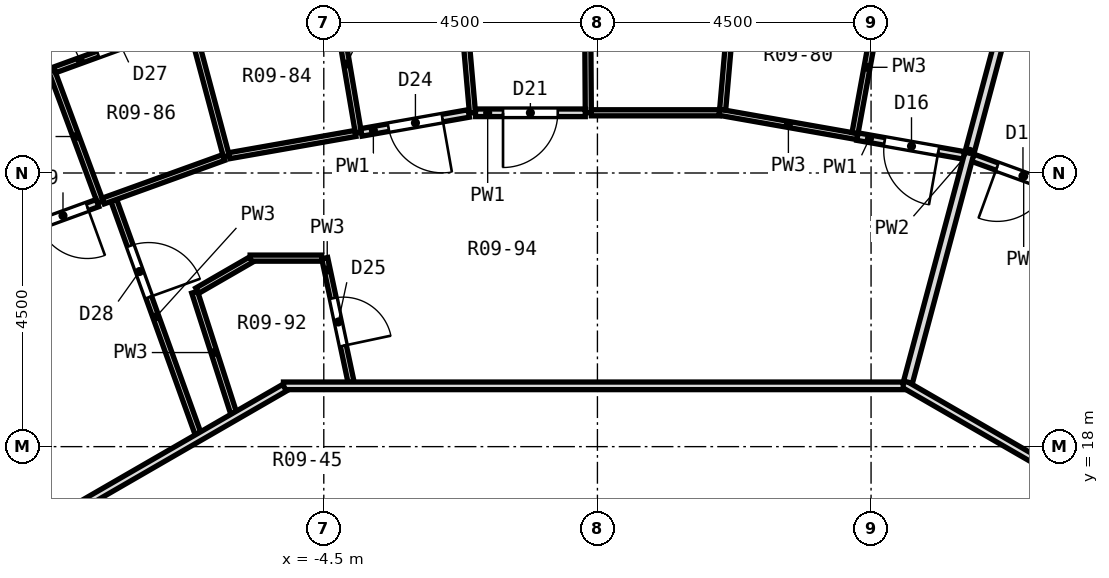
"""IFC4 building model, lengths in metres.
Left out: names, types, materials, properties, quantities, classifications, styles, units other than length and angle.
Written with IfcOpenShell. Run it as: python <this file> out.ifc"""

import sys

from ifc_helpers import new_model, si_unit, direction, frame, frame_2d, origin, place, context, subcontext, project, spatial, rectangle, extrude, element, fill, save


model = new_model("IFC4")
c1 = context("Model", 3, precision=1e-05, world=origin(), true_north=direction((0.0, 1.0)))
c2 = subcontext(c1, "Body", "Model", "MODEL_VIEW")
j1 = project(units=[si_unit("LENGTHUNIT", "METRE"), si_unit("PLANEANGLEUNIT", "RADIAN")], contexts=[c1])
p1 = place(None, origin())
s1 = spatial("IfcSite", under=j1, at=p1, CompositionType="ELEMENT")
p2 = place(p1, origin())
s2 = spatial("IfcBuilding", under=s1, at=p2, CompositionType="ELEMENT")
p3 = place(p2, frame((0.0, 0.0, 26.3)))
s3 = spatial("IfcBuildingStorey", under=s2, at=p3, CompositionType="ELEMENT", Elevation=26.3)
p4 = place(p3, frame((-0.165, 25.79, 0.0), z_axis=(0.0, 0.0, 1.0), x_axis=(0.006580899844, -0.999978345644, 0.0)))
e1 = element("IfcWall", 1, at=p4, inside=s3, PredefinedType="PARTITIONING", context=c2, shape_type="SweptSolid", body=[
    extrude(rectangle(XDim=2.3, YDim=0.1, at=frame_2d((1.15, 0.0))), origin(), (0.0, 0.0, 1.0), 2.75),
])
p5 = place(p3, frame((-2.405, 27.485, 0.0), z_axis=(0.0, 0.0, 1.0), x_axis=(0.087176012461, -0.996192924514, 0.0)))
e2 = element("IfcWall", 2, at=p5, inside=s3, PredefinedType="PARTITIONING", context=c2, shape_type="SweptSolid", body=[
    extrude(rectangle(XDim=4.01, YDim=0.1, at=frame_2d((2.005, 0.0))), origin(), (0.0, 0.0, 1.0), 2.75),
])
p6 = place(p3, frame((-4.316, 25.426, 0.0), z_axis=(0.0, 0.0, 1.0), x_axis=(0.167445855502, -0.985881273519, 0.0)))
e3 = element("IfcWall", 3, at=p6, inside=s3, PredefinedType="PARTITIONING", context=c2, shape_type="SweptSolid", body=[
    extrude(rectangle(XDim=2.299, YDim=0.1, at=frame_2d((1.15, 0.0))), origin(), (0.0, 0.0, 1.0), 2.75),
])
p7 = place(p3, frame((-4.485, 21.1, 0.0), z_axis=(0.0, 0.0, 1.0), x_axis=(0.207769107872, -0.978177896813, 0.0)))
e4 = element("IfcWall", 4, at=p7, inside=s3, PredefinedType="PARTITIONING", context=c2, shape_type="SweptSolid", body=[
    extrude(rectangle(XDim=2.084, YDim=0.1, at=frame_2d((1.042, 0.0))), origin(), (0.0, 0.0, 1.0), 2.75),
])
p8 = place(p7, frame((0.673, 0.0, 0.0)))
e5 = element("IfcOpeningElement", 5, at=p8, cuts=e4, PredefinedType="OPENING", context=c2, shape_type="SweptSolid", body=[
    extrude(rectangle(XDim=0.8, YDim=2.1, at=frame_2d((0.4, 1.05))), frame((0.0, 0.062, 0.0), z_axis=(0.0, -1.0, 0.0), x_axis=(1.0, 0.0, 0.0)), (0.0, 0.0, 1.0), 0.124),
])
p9 = place(p3, frame((-7.138, 26.651, 0.0), z_axis=(0.0, 0.0, 1.0), x_axis=(0.258102122941, -0.966117639904, 0.0)))
e6 = element("IfcWall", 6, at=p9, inside=s3, PredefinedType="PARTITIONING", context=c2, shape_type="SweptSolid", body=[
    extrude(rectangle(XDim=4.011, YDim=0.1, at=frame_2d((2.005, 0.0))), origin(), (0.0, 0.0, 1.0), 2.75),
])
p10 = place(p3, frame((-6.624, 20.54, 0.0), z_axis=(0.0, 0.0, 1.0), x_axis=(0.306694945769, -0.951807864141, 0.0)))
e7 = element("IfcWall", 7, at=p10, inside=s3, PredefinedType="PARTITIONING", context=c2, shape_type="SweptSolid", body=[
    extrude(rectangle(XDim=2.086, YDim=0.1, at=frame_2d((1.043, 0.0))), origin(), (0.0, 0.0, 1.0), 2.75),
])
p11 = place(p3, frame((-7.953, 22.049, 0.0), z_axis=(0.0, 0.0, 1.0), x_axis=(0.339432395801, -0.940630452771, 0.0)))
e8 = element("IfcWall", 8, at=p11, inside=s3, PredefinedType="PARTITIONING", context=c2, shape_type="SweptSolid", body=[
    extrude(rectangle(XDim=4.074, YDim=0.1, at=frame_2d((2.037, 0.0))), origin(), (0.0, 0.0, 1.0), 2.75),
])
p12 = place(p11, frame((0.793, 0.0, 0.0)))
e9 = element("IfcOpeningElement", 9, at=p12, cuts=e8, PredefinedType="OPENING", context=c2, shape_type="SweptSolid", body=[
    extrude(rectangle(XDim=0.9, YDim=2.1, at=frame_2d((0.45, 1.05))), frame((0.0, 0.062, 0.0), z_axis=(0.0, -1.0, 0.0), x_axis=(1.0, 0.0, 0.0)), (0.0, 0.0, 1.0), 0.124),
])
p13 = place(p3, frame((-8.975, 24.178, 0.0), z_axis=(0.0, 0.0, 1.0), x_axis=(0.347898637283, -0.937532153143, 0.0)))
e10 = element("IfcWall", 10, at=p13, inside=s3, PredefinedType="PARTITIONING", context=c2, shape_type="SweptSolid", body=[
    extrude(rectangle(XDim=2.3, YDim=0.1, at=frame_2d((1.15, 0.0))), origin(), (0.0, 0.0, 1.0), 2.75),
])
p14 = place(p3, frame((5.029, 19.036, 0.0), z_axis=(0.0, 0.0, 1.0), x_axis=(0.866024825845, -0.50000100102, 0.0)))
e11 = element("IfcWall", 11, at=p14, inside=s3, PredefinedType="PARTITIONING", context=c2, shape_type="SweptSolid", body=[
    extrude(rectangle(XDim=10.192, YDim=0.125, at=frame_2d((5.096, 0.0))), origin(), (0.0, 0.0, 1.0), 2.75),
])
p15 = place(p14, frame((3.116, 0.0, 0.0)))
e12 = element("IfcOpeningElement", 12, at=p15, cuts=e11, PredefinedType="OPENING", context=c2, shape_type="SweptSolid", body=[
    extrude(rectangle(XDim=1.0, YDim=2.1, at=frame_2d((0.5, 1.05))), frame((0.0, 0.074, 0.0), z_axis=(0.0, -1.0, 0.0), x_axis=(1.0, 0.0, 0.0)), (0.0, 0.0, 1.0), 0.149),
])
p16 = place(p3, frame((6.174, 22.75, 0.0), z_axis=(0.0, 0.0, 1.0), x_axis=(0.939613069721, -0.342238629044, 0.0)))
e13 = element("IfcWall", 13, at=p16, inside=s3, PredefinedType="PARTITIONING", context=c2, shape_type="SweptSolid", body=[
    extrude(rectangle(XDim=1.78, YDim=0.125, at=frame_2d((0.89, 0.0))), origin(), (0.0, 0.0, 1.0), 2.75),
])
p17 = place(p16, frame((0.427, 0.0, 0.0)))
e14 = element("IfcOpeningElement", 14, at=p17, cuts=e13, PredefinedType="OPENING", context=c2, shape_type="SweptSolid", body=[
    extrude(rectangle(XDim=0.9, YDim=2.1, at=frame_2d((0.45, 1.05))), frame((0.0, 0.074, 0.0), z_axis=(0.0, -1.0, 0.0), x_axis=(1.0, 0.0, 0.0)), (0.0, 0.0, 1.0), 0.149),
])
p18 = place(p3, frame((2.005, 23.499, 0.0), z_axis=(0.0, 0.0, 1.0), x_axis=(0.984814448646, -0.173610200557, 0.0)))
e15 = element("IfcWall", 15, at=p18, inside=s3, PredefinedType="PARTITIONING", context=c2, shape_type="SweptSolid", body=[
    extrude(rectangle(XDim=2.306, YDim=0.1, at=frame_2d((1.153, 0.0))), origin(), (0.0, 0.0, 1.0), 2.75),
])
p19 = place(p3, frame((4.276, 23.098, 0.0), z_axis=(0.0, 0.0, 1.0), x_axis=(0.984784939559, -0.173777509529, 0.0)))
e16 = element("IfcWall", 16, at=p19, inside=s3, PredefinedType="PARTITIONING", context=c2, shape_type="SweptSolid", body=[
    extrude(rectangle(XDim=1.78, YDim=0.125, at=frame_2d((0.89, 0.0))), origin(), (0.0, 0.0, 1.0), 2.75),
])
p20 = place(p19, frame((0.452, 0.0, 0.0)))
e17 = element("IfcOpeningElement", 17, at=p20, cuts=e16, PredefinedType="OPENING", context=c2, shape_type="SweptSolid", body=[
    extrude(rectangle(XDim=0.9, YDim=2.1, at=frame_2d((0.45, 1.05))), frame((0.0, 0.074, 0.0), z_axis=(0.0, -1.0, 0.0), x_axis=(1.0, 0.0, 0.0)), (0.0, 0.0, 1.0), 0.149),
])
p21 = place(p3, frame((-5.163, 19.0, 0.0), z_axis=(0.0, 0.0, 1.0), x_axis=(1.0, 0.0, 0.0)))
e18 = element("IfcWall", 18, at=p21, inside=s3, PredefinedType="PARTITIONING", context=c2, shape_type="SweptSolid", body=[
    extrude(rectangle(XDim=10.192, YDim=0.125, at=frame_2d((5.096, 0.0))), origin(), (0.0, 0.0, 1.0), 2.75),
])
p22 = place(p3, frame((-5.712, 21.1, 0.0), z_axis=(0.0, 0.0, 1.0), x_axis=(1.0, 0.0, 0.0)))
e19 = element("IfcWall", 19, at=p22, inside=s3, PredefinedType="PARTITIONING", context=c2, shape_type="SweptSolid", body=[
    extrude(rectangle(XDim=1.177, YDim=0.1, at=frame_2d((0.588, 0.0))), origin(), (0.0, 0.0, 1.0), 2.75),
])
p23 = place(p3, frame((-0.1, 23.49, 0.0), z_axis=(0.0, 0.0, 1.0), x_axis=(1.0, 0.0, 0.0)))
e20 = element("IfcWall", 20, at=p23, inside=s3, PredefinedType="PARTITIONING", context=c2, shape_type="SweptSolid", body=[
    extrude(rectangle(XDim=2.105, YDim=0.1, at=frame_2d((1.052, 0.0))), origin(), (0.0, 0.0, 1.0), 2.75),
])
p24 = place(p3, frame((-2.005, 23.49, 0.0), z_axis=(0.0, 0.0, 1.0), x_axis=(1.0, 0.0, 0.0)))
e21 = element("IfcWall", 21, at=p24, inside=s3, PredefinedType="PARTITIONING", context=c2, shape_type="SweptSolid", body=[
    extrude(rectangle(XDim=1.805, YDim=0.125, at=frame_2d((0.902, 0.0))), origin(), (0.0, 0.0, 1.0), 2.75),
])
p25 = place(p24, frame((0.452, 0.0, 0.0)))
e22 = element("IfcOpeningElement", 22, at=p25, cuts=e21, PredefinedType="OPENING", context=c2, shape_type="SweptSolid", body=[
    extrude(rectangle(XDim=0.9, YDim=2.1, at=frame_2d((0.45, 1.05))), frame((0.0, 0.074, 0.0), z_axis=(0.0, -1.0, 0.0), x_axis=(1.0, 0.0, 0.0)), (0.0, 0.0, 1.0), 0.149),
])
p26 = place(p3, frame((-6.054, 22.785, 0.0), z_axis=(0.0, 0.0, 1.0), x_axis=(0.984798730273, 0.173699340392, 0.0)))
e23 = element("IfcWall", 23, at=p26, inside=s3, PredefinedType="PARTITIONING", context=c2, shape_type="SweptSolid", body=[
    extrude(rectangle(XDim=2.105, YDim=0.1, at=frame_2d((1.053, 0.0))), origin(), (0.0, 0.0, 1.0), 2.75),
])
p27 = place(p3, frame((-3.882, 23.168, 0.0), z_axis=(0.0, 0.0, 1.0), x_axis=(0.984784929821, 0.173777564715, 0.0)))
e24 = element("IfcWall", 24, at=p27, inside=s3, PredefinedType="PARTITIONING", context=c2, shape_type="SweptSolid", body=[
    extrude(rectangle(XDim=1.793, YDim=0.125, at=frame_2d((0.896, 0.0))), origin(), (0.0, 0.0, 1.0), 2.75),
])
p28 = place(p27, frame((0.452, 0.0, 0.0)))
e25 = element("IfcOpeningElement", 25, at=p28, cuts=e24, PredefinedType="OPENING", context=c2, shape_type="SweptSolid", body=[
    extrude(rectangle(XDim=0.9, YDim=2.1, at=frame_2d((0.45, 1.05))), frame((0.0, 0.074, 0.0), z_axis=(0.0, -1.0, 0.0), x_axis=(1.0, 0.0, 0.0)), (0.0, 0.0, 1.0), 0.149),
])
p29 = place(p3, frame((-8.128, 22.039, 0.0), z_axis=(0.0, 0.0, 1.0), x_axis=(0.940600209608, 0.339516193553, 0.0)))
e26 = element("IfcWall", 26, at=p29, inside=s3, PredefinedType="PARTITIONING", context=c2, shape_type="SweptSolid", body=[
    extrude(rectangle(XDim=2.105, YDim=0.1, at=frame_2d((1.052, 0.0))), origin(), (0.0, 0.0, 1.0), 2.75),
])
p30 = place(p3, frame((-9.918, 21.387, 0.0), z_axis=(0.0, 0.0, 1.0), x_axis=(0.93962745072, 0.342199143561, 0.0)))
e27 = element("IfcWall", 27, at=p30, inside=s3, PredefinedType="PARTITIONING", context=c2, shape_type="SweptSolid", body=[
    extrude(rectangle(XDim=1.805, YDim=0.125, at=frame_2d((0.902, 0.0))), origin(), (0.0, 0.0, 1.0), 2.75),
])
p31 = place(p30, frame((0.777, 0.0, 0.0)))
e28 = element("IfcOpeningElement", 28, at=p31, cuts=e27, PredefinedType="OPENING", context=c2, shape_type="SweptSolid", body=[
    extrude(rectangle(XDim=0.85, YDim=2.1, at=frame_2d((0.425, 1.05))), frame((0.0, 0.074, 0.0), z_axis=(0.0, -1.0, 0.0), x_axis=(1.0, 0.0, 0.0)), (0.0, 0.0, 1.0), 0.149),
])
p32 = place(p3, frame((-8.928, 24.195, 0.0), z_axis=(0.0, 0.0, 1.0), x_axis=(0.939670512052, 0.342080880465, 0.0)))
e29 = element("IfcWall", 29, at=p32, inside=s3, PredefinedType="PARTITIONING", context=c2, shape_type="SweptSolid", body=[
    extrude(rectangle(XDim=2.321, YDim=0.1, at=frame_2d((1.161, 0.0))), origin(), (0.0, 0.0, 1.0), 2.75),
])
p33 = place(p32, frame((0.76, 0.0, 0.0)))
e30 = element("IfcOpeningElement", 30, at=p33, cuts=e29, PredefinedType="OPENING", context=c2, shape_type="SweptSolid", body=[
    extrude(rectangle(XDim=0.8, YDim=2.1, at=frame_2d((0.4, 1.05))), frame((0.0, 0.062, 0.0), z_axis=(0.0, -1.0, 0.0), x_axis=(1.0, 0.0, 0.0)), (0.0, 0.0, 1.0), 0.124),
])
p34 = place(p3, frame((-13.844, 13.947, 0.0), z_axis=(0.0, 0.0, 1.0), x_axis=(0.866031375826, 0.499989655977, 0.0)))
e31 = element("IfcWall", 31, at=p34, inside=s3, PredefinedType="PARTITIONING", context=c2, shape_type="SweptSolid", body=[
    extrude(rectangle(XDim=10.045, YDim=0.125, at=frame_2d((5.022, 0.0))), origin(), (0.0, 0.0, 1.0), 2.75),
])
p35 = place(p34, frame((3.674, 0.0, 0.0)))
e32 = element("IfcOpeningElement", 32, at=p35, cuts=e31, PredefinedType="OPENING", context=c2, shape_type="SweptSolid", body=[
    extrude(rectangle(XDim=1.0, YDim=2.1, at=frame_2d((0.5, 1.05))), frame((0.0, 0.074, 0.0), z_axis=(0.0, -1.0, 0.0), x_axis=(1.0, 0.0, 0.0)), (0.0, 0.0, 1.0), 0.149),
])
p36 = place(p3, frame((-6.581, 20.565, 0.0), z_axis=(0.0, 0.0, 1.0), x_axis=(0.866070023821, 0.499922707865, 0.0)))
e33 = element("IfcWall", 33, at=p36, inside=s3, PredefinedType="PARTITIONING", context=c2, shape_type="SweptSolid", body=[
    extrude(rectangle(XDim=1.02, YDim=0.1, at=frame_2d((0.51, 0.0))), origin(), (0.0, 0.0, 1.0), 2.75),
])
p37 = place(p3, frame((5.107, 19.06, 0.0), z_axis=(0.0, 0.0, 1.0), x_axis=(0.258797692258, 0.965931547513, 0.0)))
e34 = element("IfcWall", 34, at=p37, inside=s3, PredefinedType="PARTITIONING", context=c2, shape_type="SweptSolid", body=[
    extrude(rectangle(XDim=7.857, YDim=0.15, at=frame_2d((3.929, 0.0))), origin(), (0.0, 0.0, 1.0), 2.75),
])
p38 = place(p3, frame((4.236, 23.156, 0.0), z_axis=(0.0, 0.0, 1.0), x_axis=(0.180037913286, 0.983659671726, 0.0)))
e35 = element("IfcWall", 35, at=p38, inside=s3, PredefinedType="PARTITIONING", context=c2, shape_type="SweptSolid", body=[
    extrude(rectangle(XDim=2.199, YDim=0.1, at=frame_2d((1.1, 0.0))), origin(), (0.0, 0.0, 1.0), 2.75),
])
p39 = place(p3, frame((2.059, 23.54, 0.0), z_axis=(0.0, 0.0, 1.0), x_axis=(0.087044593785, 0.996204416118, 0.0)))
e36 = element("IfcWall", 36, at=p39, inside=s3, PredefinedType="PARTITIONING", context=c2, shape_type="SweptSolid", body=[
    extrude(rectangle(XDim=3.96, YDim=0.1, at=frame_2d((1.98, 0.0))), origin(), (0.0, 0.0, 1.0), 2.75),
])
p40 = place(p17, frame((0.9, 0.0, 0.0), z_axis=(0.0, 0.0, 1.0), x_axis=(-1.0, 0.0, 0.0)))
e37 = element("IfcDoor", 37, at=p40, inside=s3, OperationType="SINGLE_SWING_RIGHT", PredefinedType="DOOR", context=c2, shape_type="SweptSolid", body=[
    extrude(rectangle(XDim=0.9, YDim=2.1, at=frame_2d((0.45, 1.05))), frame((0.0, 0.025, 0.0), z_axis=(0.0, -1.0, 0.0), x_axis=(1.0, 0.0, 0.0)), (0.0, 0.0, 1.0), 0.05),
])
fill(e14, e37)
p41 = place(p20, frame((0.9, 0.0, 0.0), z_axis=(0.0, 0.0, 1.0), x_axis=(-1.0, 0.0, 0.0)))
e38 = element("IfcDoor", 38, at=p41, inside=s3, OperationType="SINGLE_SWING_LEFT", PredefinedType="DOOR", context=c2, shape_type="SweptSolid", body=[
    extrude(rectangle(XDim=0.9, YDim=2.1, at=frame_2d((0.45, 1.05))), frame((0.0, 0.025, 0.0), z_axis=(0.0, -1.0, 0.0), x_axis=(1.0, 0.0, 0.0)), (0.0, 0.0, 1.0), 0.05),
])
fill(e17, e38)
p42 = place(p25, frame((0.9, 0.0, 0.0), z_axis=(0.0, 0.0, 1.0), x_axis=(-1.0, 0.0, 0.0)))
e39 = element("IfcDoor", 39, at=p42, inside=s3, OperationType="SINGLE_SWING_RIGHT", PredefinedType="DOOR", context=c2, shape_type="SweptSolid", body=[
    extrude(rectangle(XDim=0.9, YDim=2.1, at=frame_2d((0.45, 1.05))), frame((0.0, 0.025, 0.0), z_axis=(0.0, -1.0, 0.0), x_axis=(1.0, 0.0, 0.0)), (0.0, 0.0, 1.0), 0.05),
])
fill(e22, e39)
p43 = place(p28, frame((0.9, 0.0, 0.0), z_axis=(0.0, 0.0, 1.0), x_axis=(-1.0, 0.0, 0.0)))
e40 = element("IfcDoor", 40, at=p43, inside=s3, OperationType="SINGLE_SWING_LEFT", PredefinedType="DOOR", context=c2, shape_type="SweptSolid", body=[
    extrude(rectangle(XDim=0.9, YDim=2.1, at=frame_2d((0.45, 1.05))), frame((0.0, 0.025, 0.0), z_axis=(0.0, -1.0, 0.0), x_axis=(1.0, 0.0, 0.0)), (0.0, 0.0, 1.0), 0.05),
])
fill(e25, e40)
p44 = place(p8, origin())
e41 = element("IfcDoor", 41, at=p44, inside=s3, OperationType="SINGLE_SWING_RIGHT", PredefinedType="DOOR", context=c2, shape_type="SweptSolid", body=[
    extrude(rectangle(XDim=0.8, YDim=2.1, at=frame_2d((0.4, 1.05))), frame((0.0, 0.025, 0.0), z_axis=(0.0, -1.0, 0.0), x_axis=(1.0, 0.0, 0.0)), (0.0, 0.0, 1.0), 0.05),
])
fill(e5, e41)
p45 = place(p33, origin())
e42 = element("IfcDoor", 42, at=p45, inside=s3, OperationType="SINGLE_SWING_RIGHT", PredefinedType="DOOR", context=c2, shape_type="SweptSolid", body=[
    extrude(rectangle(XDim=0.8, YDim=2.1, at=frame_2d((0.4, 1.05))), frame((0.0, 0.025, 0.0), z_axis=(0.0, -1.0, 0.0), x_axis=(1.0, 0.0, 0.0)), (0.0, 0.0, 1.0), 0.05),
])
fill(e30, e42)
p46 = place(p12, origin())
e43 = element("IfcDoor", 43, at=p46, inside=s3, OperationType="SINGLE_SWING_RIGHT", PredefinedType="DOOR", context=c2, shape_type="SweptSolid", body=[
    extrude(rectangle(XDim=0.9, YDim=2.1, at=frame_2d((0.45, 1.05))), frame((0.0, 0.025, 0.0), z_axis=(0.0, -1.0, 0.0), x_axis=(1.0, 0.0, 0.0)), (0.0, 0.0, 1.0), 0.05),
])
fill(e9, e43)
p47 = place(p31, frame((0.85, 0.0, 0.0), z_axis=(0.0, 0.0, 1.0), x_axis=(-1.0, 0.0, 0.0)))
e44 = element("IfcDoor", 44, at=p47, inside=s3, OperationType="SINGLE_SWING_LEFT", PredefinedType="DOOR", context=c2, shape_type="SweptSolid", body=[
    extrude(rectangle(XDim=0.85, YDim=2.1, at=frame_2d((0.425, 1.05))), frame((0.0, 0.025, 0.0), z_axis=(0.0, -1.0, 0.0), x_axis=(1.0, 0.0, 0.0)), (0.0, 0.0, 1.0), 0.05),
])
fill(e28, e44)
save(model, sys.argv[1])
